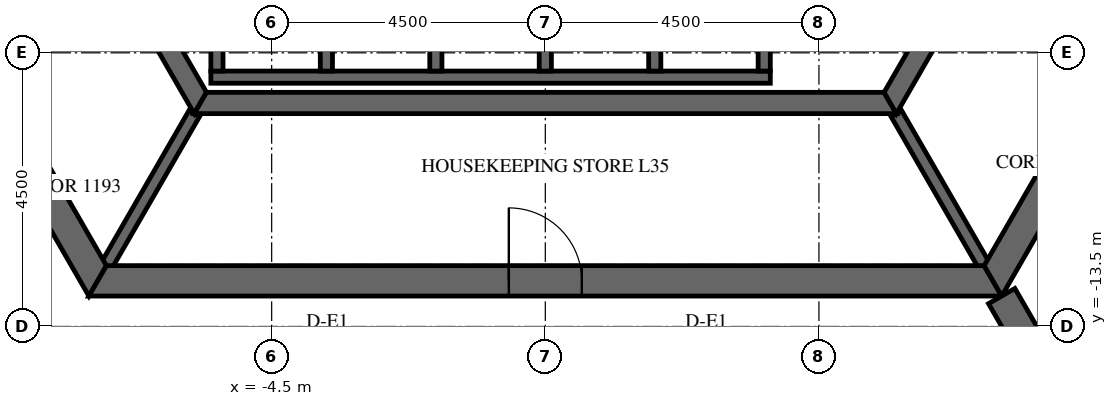
"""IFC4 building model, lengths in metres.
Left out: names, types, materials, properties, quantities, classifications, styles, units other than length and angle.
Written with IfcOpenShell. Run it as: python <this file> out.ifc"""

import sys

from ifc_helpers import new_model, si_unit, direction, frame, frame_2d, origin, place, context, subcontext, project, spatial, polyline, rectangle, outline, extrude, element, fill, save


model = new_model("IFC4")
c1 = context("Model", 3, precision=1e-05, world=origin(), true_north=direction((0.0, 1.0)))
c2 = subcontext(c1, "Body", "Model", "MODEL_VIEW")
j1 = project(units=[si_unit("LENGTHUNIT", "METRE"), si_unit("PLANEANGLEUNIT", "RADIAN")], contexts=[c1])
p1 = place(None, origin())
s1 = spatial("IfcSite", under=j1, at=p1, CompositionType="ELEMENT")
p2 = place(p1, origin())
s2 = spatial("IfcBuilding", under=s1, at=p2, CompositionType="ELEMENT")
p3 = place(p2, frame((0.0, 0.0, 152.7)))
s3 = spatial("IfcBuildingStorey", under=s2, at=p3, CompositionType="ELEMENT", Elevation=152.7)
p4 = place(p3, frame((-14.722, 0.0, 0.0), z_axis=(0.0, 0.0, 1.0), x_axis=(0.50000571537, -0.866022103989, 0.0)))
e1 = element("IfcWall", 1, at=p4, inside=s3, PredefinedType="SHEAR", context=c2, shape_type="SweptSolid", body=[
    extrude(outline(polyline([(-0.144, -0.25), (14.867, -0.25), (14.578, 0.25), (0.144, 0.25), (-0.144, -0.25)])), origin(), (0.0, 0.0, 1.0), 3.75),
])
p5 = place(p4, frame((6.432, 0.0, 0.0)))
e2 = element("IfcOpeningElement", 2, at=p5, cuts=e1, PredefinedType="OPENING", context=c2, shape_type="SweptSolid", body=[
    extrude(rectangle(XDim=1.8, YDim=2.4, at=frame_2d((0.9, 1.2))), frame((0.0, 0.26, 0.0), z_axis=(0.0, -1.0, 0.0), x_axis=(1.0, 0.0, 0.0)), (0.0, 0.0, 1.0), 0.52),
])
p6 = place(p3, frame((-7.361, -12.75, 0.0), z_axis=(0.0, 0.0, 1.0), x_axis=(1.0, 0.0, 0.0)))
e3 = element("IfcWall", 3, at=p6, inside=s3, PredefinedType="SHEAR", context=c2, shape_type="SweptSolid", body=[
    extrude(outline(polyline([(-0.144, -0.25), (14.866, -0.25), (14.578, 0.25), (0.144, 0.25), (-0.144, -0.25)])), origin(), (0.0, 0.0, 1.0), 3.75),
])
p7 = place(p6, frame((6.761, 0.0, 0.0)))
e4 = element("IfcOpeningElement", 4, at=p7, cuts=e3, PredefinedType="OPENING", context=c2, shape_type="SweptSolid", body=[
    extrude(rectangle(XDim=1.2, YDim=2.4, at=frame_2d((0.6, 1.2))), frame((0.0, 0.26, 0.0), z_axis=(0.0, -1.0, 0.0), x_axis=(1.0, 0.0, 0.0)), (0.0, 0.0, 1.0), 0.52),
])
p8 = place(p3, frame((7.361, -12.75, 0.0), z_axis=(0.0, 0.0, 1.0), x_axis=(0.50000571537, 0.866022103989, 0.0)))
e5 = element("IfcWall", 5, at=p8, inside=s3, PredefinedType="SHEAR", context=c2, shape_type="SweptSolid", body=[
    extrude(outline(polyline([(-0.144, -0.25), (14.867, -0.25), (14.578, 0.25), (0.144, 0.25), (-0.144, -0.25)])), origin(), (0.0, 0.0, 1.0), 3.75),
])
p9 = place(p8, frame((6.49, 0.0, 0.0)))
e6 = element("IfcOpeningElement", 6, at=p9, cuts=e5, PredefinedType="OPENING", context=c2, shape_type="SweptSolid", body=[
    extrude(rectangle(XDim=1.8, YDim=2.4, at=frame_2d((0.9, 1.2))), frame((0.0, 0.26, 0.0), z_axis=(0.0, -1.0, 0.0), x_axis=(1.0, 0.0, 0.0)), (0.0, 0.0, 1.0), 0.52),
])
p10 = place(p3, frame((7.506, -13.0, 0.0), z_axis=(0.0, 0.0, 1.0), x_axis=(0.499988271576, -0.866032175087, 0.0)))
e7 = element("IfcWall", 7, at=p10, inside=s3, PredefinedType="SHEAR", context=c2, shape_type="SweptSolid", body=[
    extrude(rectangle(XDim=15.424, YDim=0.5, at=frame_2d((7.712, 0.0))), origin(), (0.0, 0.0, 1.0), 3.75),
])
p11 = place(p10, frame((6.812, 0.0, 0.0)))
e8 = element("IfcOpeningElement", 8, at=p11, cuts=e7, PredefinedType="OPENING", context=c2, shape_type="SweptSolid", body=[
    extrude(rectangle(XDim=1.8, YDim=2.4, at=frame_2d((0.9, 1.2))), frame((0.0, 0.26, 0.0), z_axis=(0.0, -1.0, 0.0), x_axis=(1.0, 0.0, 0.0)), (0.0, 0.0, 1.0), 0.52),
])
p12 = place(p3, frame((-11.345, 0.0, 0.0), z_axis=(0.0, 0.0, 1.0), x_axis=(0.499995046907, -0.866028263435, 0.0)))
e9 = element("IfcWall", 9, at=p12, inside=s3, PredefinedType="SHEAR", context=c2, shape_type="SweptSolid", body=[
    extrude(outline(polyline([(-0.101, -0.175), (11.446, -0.175), (11.244, 0.175), (0.101, 0.175), (-0.101, -0.175)])), origin(), (0.0, 0.0, 1.0), 3.75),
])
p13 = place(p12, frame((4.744, 0.0, 0.0)))
e10 = element("IfcOpeningElement", 10, at=p13, cuts=e9, PredefinedType="OPENING", context=c2, shape_type="SweptSolid", body=[
    extrude(rectangle(XDim=1.8, YDim=2.4, at=frame_2d((0.9, 1.2))), frame((0.0, 0.185, 0.0), z_axis=(0.0, -1.0, 0.0), x_axis=(1.0, 0.0, 0.0)), (0.0, 0.0, 1.0), 0.37),
])
p14 = place(p3, frame((-5.673, -9.825, 0.0), z_axis=(0.0, 0.0, 1.0), x_axis=(1.0, 0.0, 0.0)))
e11 = element("IfcWall", 11, at=p14, inside=s3, PredefinedType="SHEAR", context=c2, shape_type="SweptSolid", body=[
    extrude(outline(polyline([(-0.101, -0.175), (11.446, -0.175), (11.244, 0.175), (0.101, 0.175), (-0.101, -0.175)])), origin(), (0.0, 0.0, 1.0), 3.75),
])
p15 = place(p3, frame((5.673, -9.825, 0.0), z_axis=(0.0, 0.0, 1.0), x_axis=(0.499995046907, 0.866028263435, 0.0)))
e12 = element("IfcWall", 12, at=p15, inside=s3, PredefinedType="SHEAR", context=c2, shape_type="SweptSolid", body=[
    extrude(outline(polyline([(-0.101, -0.175), (11.446, -0.175), (11.244, 0.175), (0.101, 0.175), (-0.101, -0.175)])), origin(), (0.0, 0.0, 1.0), 3.75),
])
p16 = place(p15, frame((4.801, 0.0, 0.0)))
e13 = element("IfcOpeningElement", 13, at=p16, cuts=e12, PredefinedType="OPENING", context=c2, shape_type="SweptSolid", body=[
    extrude(rectangle(XDim=1.8, YDim=2.4, at=frame_2d((0.9, 1.2))), frame((0.0, 0.185, 0.0), z_axis=(0.0, -1.0, 0.0), x_axis=(1.0, 0.0, 0.0)), (0.0, 0.0, 1.0), 0.37),
])
p17 = place(p3, frame((-5.5, -9.4, -0.5), z_axis=(0.0, 0.0, 1.0), x_axis=(1.0, 0.0, 0.0)))
e14 = element("IfcWall", 14, at=p17, inside=s3, PredefinedType="SHEAR", context=c2, shape_type="SweptSolid", body=[
    extrude(rectangle(XDim=9.2, YDim=0.2, at=frame_2d((4.6, 0.0))), origin(), (0.0, 0.0, 1.0), 4.15),
])
for number, where, z_axis, x_axis in (
    (15, (-5.4, -9.3, -0.5), (0.0, 0.0, 1.0), (0.0, 1.0, 0.0)),
    (16, (-3.6, -9.3, -0.5), (0.0, 0.0, 1.0), (0.0, 1.0, 0.0)),
    (17, (-1.8, -9.3, -0.5), (0.0, 0.0, 1.0), (0.0, 1.0, 0.0)),
    (18, (0.0, -9.3, -0.5), (0.0, 0.0, 1.0), (0.0, 1.0, 0.0)),
    (19, (1.8, -9.3, -0.5), (0.0, 0.0, 1.0), (0.0, 1.0, 0.0)),
    (20, (3.6, -9.3, -0.5), (0.0, 0.0, 1.0), (0.0, 1.0, 0.0)),
):
    element("IfcWall", number, at=place(p3, frame(where, z_axis=z_axis, x_axis=x_axis)), inside=s3, PredefinedType="SHEAR", context=c2, shape_type="SweptSolid", body=[
        extrude(rectangle(XDim=2.9, YDim=0.2, at=frame_2d((1.45, 0.0))), origin(), (0.0, 0.0, 1.0), 4.15),
    ])
for number, where, z_axis, x_axis in (
    (21, (-5.773, -10.0, 0.0), (0.0, 0.0, 1.0), (-0.5, -0.866, 0.0)),
    (22, (5.773, -10.0, 0.0), (0.0, 0.0, 1.0), (0.5, -0.866, 0.0)),
):
    element("IfcWall", number, at=place(p3, frame(where, z_axis=z_axis, x_axis=x_axis)), inside=s3, PredefinedType="SHEAR", context=c2, shape_type="SweptSolid", body=[
        extrude(rectangle(XDim=2.887, YDim=0.2, at=frame_2d((1.443, 0.0))), origin(), (0.0, 0.0, 1.0), 3.75),
    ])
p18 = place(p7, origin())
e23 = element("IfcDoor", 23, at=p18, inside=s3, OperationType="SINGLE_SWING_LEFT", PredefinedType="DOOR", context=c2, shape_type="SweptSolid", body=[
    extrude(rectangle(XDim=1.2, YDim=2.4, at=frame_2d((0.6, 1.2))), frame((0.0, 0.025, 0.0), z_axis=(0.0, -1.0, 0.0), x_axis=(1.0, 0.0, 0.0)), (0.0, 0.0, 1.0), 0.05),
])
fill(e4, e23)
save(model, sys.argv[1])
